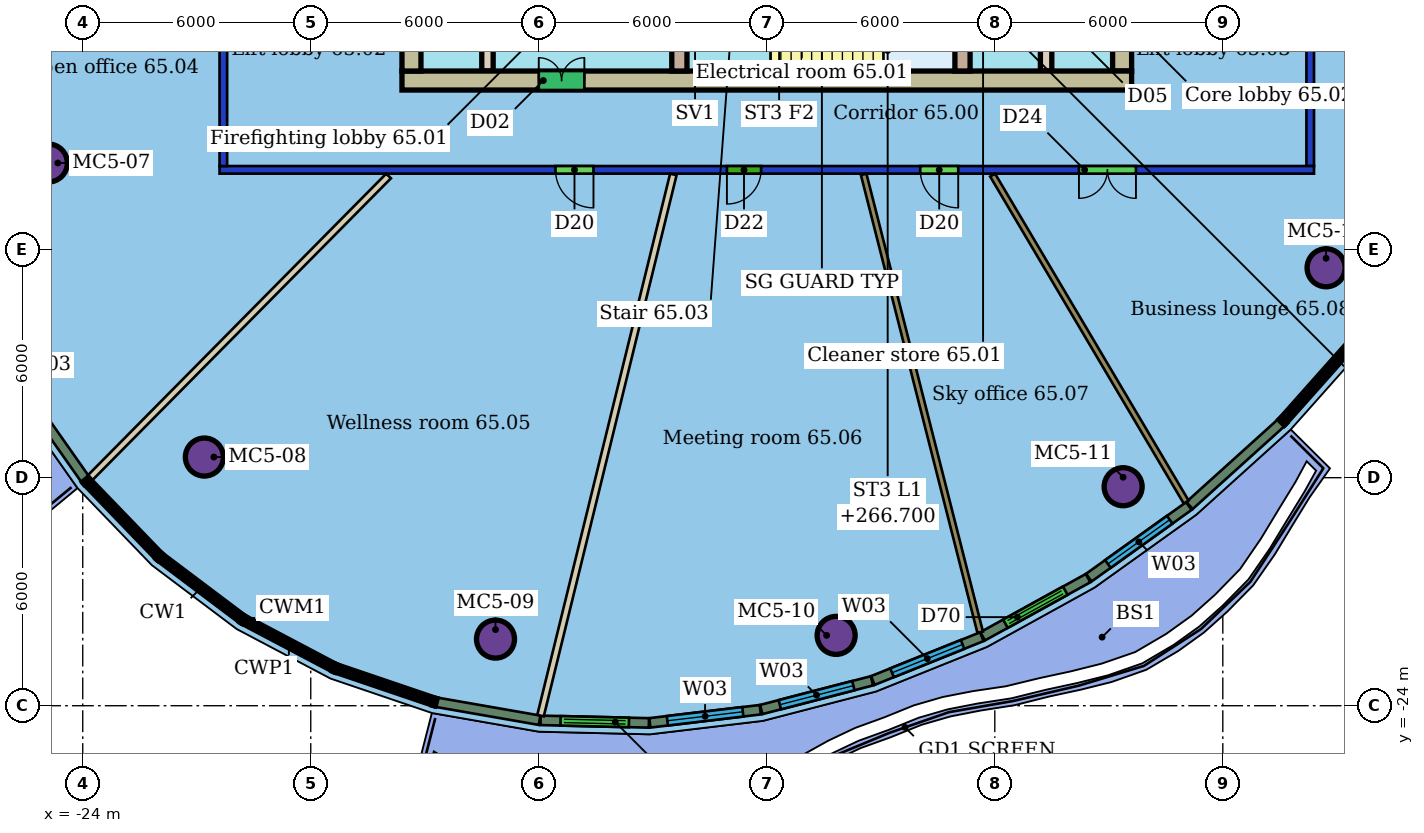
"""IFC4 building model, lengths in metres.
Left out: names, types, materials, properties, quantities, classifications, styles, units other than length and angle.
Written with IfcOpenShell. Run it as: python <this file> out.ifc"""

import sys

from ifc_helpers import new_model, si_unit, direction, frame, frame_2d, origin, origin_2d, place, context, subcontext, project, spatial, rectangle, hollow_circle, extrude, element, fill, save


model = new_model("IFC4")
c1 = context("Model", 3, precision=1e-05, world=origin(), true_north=direction((0.0, 1.0)))
c2 = subcontext(c1, "Body", "Model", "MODEL_VIEW")
j1 = project(units=[si_unit("LENGTHUNIT", "METRE"), si_unit("PLANEANGLEUNIT", "RADIAN")], contexts=[c1])
p1 = place(None, origin())
s1 = spatial("IfcSite", under=j1, at=p1, CompositionType="ELEMENT")
p2 = place(p1, origin())
s2 = spatial("IfcBuilding", under=s1, at=p2, CompositionType="ELEMENT")
p3 = place(p2, frame((0.0, 0.0, 264.9)))
s3 = spatial("IfcBuildingStorey", under=s2, at=p3, CompositionType="ELEMENT", Elevation=264.9)
for number, where, z_axis, x_axis in (
    (1, (-24.906, -9.72, 0.0), (0.0, 0.0, 1.0), (1.0, 0.0, 0.0)),
    (2, (-20.8, -17.457, 0.0), (0.0, 0.0, 1.0), (1.0, 0.0, 0.0)),
    (3, (-13.138, -22.247, 0.0), (0.0, 0.0, 1.0), (1.0, 0.0, 0.0)),
    (4, (-4.175, -22.149, 0.0), (0.0, 0.0, 1.0), (1.0, 0.0, 0.0)),
    (5, (3.377, -18.238, 0.0), (0.0, 0.0, 1.0), (1.0, 0.0, 0.0)),
    (6, (8.718, -12.477, 0.0), (0.0, 0.0, 1.0), (1.0, 0.0, 0.0)),
):
    element("IfcColumn", number, at=place(p3, frame(where, z_axis=z_axis, x_axis=x_axis)), inside=s3, PredefinedType="COLUMN", context=c2, shape_type="SweptSolid", body=[
        extrude(hollow_circle(Radius=0.5, WallThickness=0.04, at=origin_2d()), origin(), (0.0, 0.0, 1.0), 3.45),
    ])
p4 = place(p3, frame((8.4, -9.9, 0.0), z_axis=(0.0, 0.0, 1.0), x_axis=(-1.0, 0.0, 0.0)))
e7 = element("IfcWall", 7, at=p4, inside=s3, PredefinedType="PARTITIONING", context=c2, shape_type="SweptSolid", body=[
    extrude(rectangle(XDim=28.8, YDim=0.2, at=frame_2d((14.4, 0.0))), origin(), (0.0, 0.0, 1.0), 3.1),
])
p5 = place(p4, frame((18.96, 0.0, 0.0)))
e8 = element("IfcOpeningElement", 8, at=p5, cuts=e7, PredefinedType="OPENING", context=c2, shape_type="SweptSolid", body=[
    extrude(rectangle(XDim=1.0, YDim=2.1, at=frame_2d((0.5, 1.05))), frame((0.0, 0.11, 0.0), z_axis=(0.0, -1.0, 0.0), x_axis=(1.0, 0.0, 0.0)), (0.0, 0.0, 1.0), 0.22),
])
p6 = place(p4, frame((14.549, 0.0, 0.0)))
e9 = element("IfcOpeningElement", 9, at=p6, cuts=e7, PredefinedType="OPENING", context=c2, shape_type="SweptSolid", body=[
    extrude(rectangle(XDim=0.9, YDim=2.1, at=frame_2d((0.45, 1.05))), frame((0.0, 0.11, 0.0), z_axis=(0.0, -1.0, 0.0), x_axis=(1.0, 0.0, 0.0)), (0.0, 0.0, 1.0), 0.22),
])
p7 = place(p4, frame((9.362, 0.0, 0.0)))
e10 = element("IfcOpeningElement", 10, at=p7, cuts=e7, PredefinedType="OPENING", context=c2, shape_type="SweptSolid", body=[
    extrude(rectangle(XDim=1.0, YDim=2.1, at=frame_2d((0.5, 1.05))), frame((0.0, 0.11, 0.0), z_axis=(0.0, -1.0, 0.0), x_axis=(1.0, 0.0, 0.0)), (0.0, 0.0, 1.0), 0.22),
])
p8 = place(p4, frame((4.686, 0.0, 0.0)))
e11 = element("IfcOpeningElement", 11, at=p8, cuts=e7, PredefinedType="OPENING", context=c2, shape_type="SweptSolid", body=[
    extrude(rectangle(XDim=1.5, YDim=2.1, at=frame_2d((0.75, 1.05))), frame((0.0, 0.11, 0.0), z_axis=(0.0, -1.0, 0.0), x_axis=(1.0, 0.0, 0.0)), (0.0, 0.0, 1.0), 0.22),
])
p9 = place(p3, frame((-20.3, -9.8, 0.0), z_axis=(0.0, 0.0, 1.0), x_axis=(0.0, 1.0, 0.0)))
e12 = element("IfcWall", 12, at=p9, inside=s3, PredefinedType="PARTITIONING", context=c2, shape_type="SweptSolid", body=[
    extrude(rectangle(XDim=19.6, YDim=0.2, at=frame_2d((9.8, 0.0))), origin(), (0.0, 0.0, 1.0), 3.1),
])
p10 = place(p9, frame((13.483, 0.0, 0.0)))
e13 = element("IfcOpeningElement", 13, at=p10, cuts=e12, PredefinedType="OPENING", context=c2, shape_type="SweptSolid", body=[
    extrude(rectangle(XDim=1.5, YDim=2.4, at=frame_2d((0.75, 1.2))), frame((0.0, 0.11, 0.0), z_axis=(0.0, -1.0, 0.0), x_axis=(1.0, 0.0, 0.0)), (0.0, 0.0, 1.0), 0.22),
])
p11 = place(p9, frame((6.323, 0.0, 0.0)))
e14 = element("IfcOpeningElement", 14, at=p11, cuts=e12, PredefinedType="OPENING", context=c2, shape_type="SweptSolid", body=[
    extrude(rectangle(XDim=1.8, YDim=2.1, at=frame_2d((0.9, 1.05))), frame((0.0, 0.11, 0.0), z_axis=(0.0, -1.0, 0.0), x_axis=(1.0, 0.0, 0.0)), (0.0, 0.0, 1.0), 0.22),
])
p12 = place(p3, frame((8.3, 9.8, 0.0), z_axis=(0.0, 0.0, 1.0), x_axis=(0.0, -1.0, 0.0)))
e15 = element("IfcWall", 15, at=p12, inside=s3, PredefinedType="PARTITIONING", context=c2, shape_type="SweptSolid", body=[
    extrude(rectangle(XDim=19.6, YDim=0.2, at=frame_2d((9.8, 0.0))), origin(), (0.0, 0.0, 1.0), 3.1),
])
p13 = place(p12, frame((7.946, 0.0, 0.0)))
e16 = element("IfcOpeningElement", 16, at=p13, cuts=e15, PredefinedType="OPENING", context=c2, shape_type="SweptSolid", body=[
    extrude(rectangle(XDim=1.8, YDim=2.4, at=frame_2d((0.9, 1.2))), frame((0.0, 0.11, 0.0), z_axis=(0.0, -1.0, 0.0), x_axis=(1.0, 0.0, 0.0)), (0.0, 0.0, 1.0), 0.22),
])
p14 = place(p12, frame((2.533, 0.0, 0.0)))
e17 = element("IfcOpeningElement", 17, at=p14, cuts=e15, PredefinedType="OPENING", context=c2, shape_type="SweptSolid", body=[
    extrude(rectangle(XDim=1.0, YDim=2.4, at=frame_2d((0.5, 1.2))), frame((0.0, 0.11, 0.0), z_axis=(0.0, -1.0, 0.0), x_axis=(1.0, 0.0, 0.0)), (0.0, 0.0, 1.0), 0.22),
])
p15 = place(p3, frame((-23.809, -18.004, 0.0), z_axis=(0.0, 0.0, 1.0), x_axis=(0.703239034198, 0.710953487073, 0.0)))
e18 = element("IfcWall", 18, at=p15, inside=s3, PredefinedType="PARTITIONING", context=c2, shape_type="SweptSolid", body=[
    extrude(rectangle(XDim=11.171, YDim=0.175, at=frame_2d((5.586, 0.0))), origin(), (0.0, 0.0, 1.0), 3.45),
])
p16 = place(p3, frame((-11.954, -24.26, 0.0), z_axis=(0.0, 0.0, 1.0), x_axis=(0.238333250225, 0.971183433671, 0.0)))
e19 = element("IfcWall", 19, at=p16, inside=s3, PredefinedType="PARTITIONING", context=c2, shape_type="SweptSolid", body=[
    extrude(rectangle(XDim=14.662, YDim=0.175, at=frame_2d((7.331, 0.0))), origin(), (0.0, 0.0, 1.0), 3.45),
])
p17 = place(p3, frame((-0.384, -22.067, 0.0), z_axis=(0.0, 0.0, 1.0), x_axis=(-0.246627305847, 0.969110402385, 0.0)))
e20 = element("IfcWall", 20, at=p17, inside=s3, PredefinedType="PARTITIONING", context=c2, shape_type="SweptSolid", body=[
    extrude(rectangle(XDim=12.432, YDim=0.15, at=frame_2d((6.216, 0.0))), origin(), (0.0, 0.0, 1.0), 3.45),
])
p18 = place(p3, frame((5.037, -18.642, 0.0), z_axis=(0.0, 0.0, 1.0), x_axis=(-0.509438244873, 0.860507219412, 0.0)))
e21 = element("IfcWall", 21, at=p18, inside=s3, PredefinedType="PARTITIONING", context=c2, shape_type="SweptSolid", body=[
    extrude(rectangle(XDim=9.999, YDim=0.15, at=frame_2d((5.0, 0.0))), origin(), (0.0, 0.0, 1.0), 3.45),
])
p19 = place(p3, frame((13.298, -8.276, 0.0), z_axis=(0.0, 0.0, 1.0), x_axis=(-0.919039472238, 0.39416550898, 0.0)))
e22 = element("IfcWall", 22, at=p19, inside=s3, PredefinedType="PARTITIONING", context=c2, shape_type="SweptSolid", body=[
    extrude(rectangle(XDim=5.265, YDim=0.3, at=frame_2d((2.633, 0.0))), origin(), (0.0, 0.0, 1.0), 3.45),
])
p20 = place(p3, frame((-25.516, -15.791, 0.0), z_axis=(0.0, 0.0, 1.0), x_axis=(0.574964816713, -0.818178134358, 0.0)))
e23 = element("IfcWall", 23, at=p20, inside=s3, PredefinedType="SOLIDWALL", context=c2, shape_type="SweptSolid", body=[
    extrude(rectangle(XDim=2.746, YDim=0.25, at=frame_2d((1.373, 0.0))), origin(), (0.0, 0.0, 1.0), 3.15),
])
p21 = place(p3, frame((-14.684, -23.91, 0.0), z_axis=(0.0, 0.0, 1.0), x_axis=(0.985123538197, -0.171847649069, 0.0)))
e24 = element("IfcWall", 24, at=p21, inside=s3, PredefinedType="SOLIDWALL", context=c2, shape_type="SweptSolid", body=[
    extrude(rectangle(XDim=2.746, YDim=0.25, at=frame_2d((1.373, 0.0))), origin(), (0.0, 0.0, 1.0), 3.15),
])
p22 = place(p3, frame((-11.952, -24.385, 0.0), z_axis=(0.0, 0.0, 1.0), x_axis=(0.999718659369, -0.023719235002, 0.0)))
e25 = element("IfcWall", 25, at=p22, inside=s3, PredefinedType="SOLIDWALL", context=c2, shape_type="SweptSolid", body=[
    extrude(rectangle(XDim=2.851, YDim=0.25, at=frame_2d((1.426, 0.0))), origin(), (0.0, 0.0, 1.0), 3.15),
])
p23 = place(p22, frame((0.526, 0.0, 0.0)))
e26 = element("IfcOpeningElement", 26, at=p23, cuts=e25, PredefinedType="OPENING", context=c2, shape_type="SweptSolid", body=[
    extrude(rectangle(XDim=1.8, YDim=2.4, at=frame_2d((0.9, 1.2))), frame((0.0, 0.135, 0.0), z_axis=(0.0, -1.0, 0.0), x_axis=(1.0, 0.0, 0.0)), (0.0, 0.0, 1.0), 0.27),
])
p24 = place(p3, frame((-9.076, -24.451, 0.0), z_axis=(0.0, 0.0, 1.0), x_axis=(0.992981045758, 0.11827359285, 0.0)))
e27 = element("IfcWall", 27, at=p24, inside=s3, PredefinedType="SOLIDWALL", context=c2, shape_type="SweptSolid", body=[
    extrude(rectangle(XDim=2.927, YDim=0.25, at=frame_2d((1.463, 0.0))), origin(), (0.0, 0.0, 1.0), 3.15),
])
p25 = place(p24, frame((0.463, 0.0, 0.9)))
e28 = element("IfcOpeningElement", 28, at=p25, cuts=e27, PredefinedType="OPENING", context=c2, shape_type="SweptSolid", body=[
    extrude(rectangle(XDim=2.0, YDim=2.1, at=frame_2d((1.0, 1.05))), frame((0.0, 0.135, 0.0), z_axis=(0.0, -1.0, 0.0), x_axis=(1.0, 0.0, 0.0)), (0.0, 0.0, 1.0), 0.27),
])
p26 = place(p3, frame((-6.146, -24.1, 0.0), z_axis=(0.0, 0.0, 1.0), x_axis=(0.967956734752, 0.25111702381, 0.0)))
e29 = element("IfcWall", 29, at=p26, inside=s3, PredefinedType="SOLIDWALL", context=c2, shape_type="SweptSolid", body=[
    extrude(rectangle(XDim=3.009, YDim=0.25, at=frame_2d((1.504, 0.0))), origin(), (0.0, 0.0, 1.0), 3.15),
])
p27 = place(p26, frame((0.505, 0.0, 0.9)))
e30 = element("IfcOpeningElement", 30, at=p27, cuts=e29, PredefinedType="OPENING", context=c2, shape_type="SweptSolid", body=[
    extrude(rectangle(XDim=2.0, YDim=2.1, at=frame_2d((1.0, 1.05))), frame((0.0, 0.135, 0.0), z_axis=(0.0, -1.0, 0.0), x_axis=(1.0, 0.0, 0.0)), (0.0, 0.0, 1.0), 0.27),
])
p28 = place(p3, frame((-3.21, -23.337, 0.0), z_axis=(0.0, 0.0, 1.0), x_axis=(0.927849089634, 0.372955851093, 0.0)))
e31 = element("IfcWall", 31, at=p28, inside=s3, PredefinedType="SOLIDWALL", context=c2, shape_type="SweptSolid", body=[
    extrude(rectangle(XDim=3.092, YDim=0.25, at=frame_2d((1.546, 0.0))), origin(), (0.0, 0.0, 1.0), 3.15),
])
p29 = place(p28, frame((0.546, 0.0, 0.9)))
e32 = element("IfcOpeningElement", 32, at=p29, cuts=e31, PredefinedType="OPENING", context=c2, shape_type="SweptSolid", body=[
    extrude(rectangle(XDim=2.0, YDim=2.1, at=frame_2d((1.0, 1.05))), frame((0.0, 0.135, 0.0), z_axis=(0.0, -1.0, 0.0), x_axis=(1.0, 0.0, 0.0)), (0.0, 0.0, 1.0), 0.27),
])
p30 = place(p3, frame((-0.32, -22.174, 0.0), z_axis=(0.0, 0.0, 1.0), x_axis=(0.875491155983, 0.483234141794, 0.0)))
e33 = element("IfcWall", 33, at=p30, inside=s3, PredefinedType="SOLIDWALL", context=c2, shape_type="SweptSolid", body=[
    extrude(rectangle(XDim=3.169, YDim=0.25, at=frame_2d((1.584, 0.0))), origin(), (0.0, 0.0, 1.0), 3.15),
])
p31 = place(p30, frame((0.685, 0.0, 0.0)))
e34 = element("IfcOpeningElement", 34, at=p31, cuts=e33, PredefinedType="OPENING", context=c2, shape_type="SweptSolid", body=[
    extrude(rectangle(XDim=1.8, YDim=2.4, at=frame_2d((0.9, 1.2))), frame((0.0, 0.135, 0.0), z_axis=(0.0, -1.0, 0.0), x_axis=(1.0, 0.0, 0.0)), (0.0, 0.0, 1.0), 0.27),
])
p32 = place(p3, frame((2.474, -20.63, 0.0), z_axis=(0.0, 0.0, 1.0), x_axis=(0.81314194721, 0.582065437634, 0.0)))
e35 = element("IfcWall", 35, at=p32, inside=s3, PredefinedType="SOLIDWALL", context=c2, shape_type="SweptSolid", body=[
    extrude(rectangle(XDim=3.237, YDim=0.25, at=frame_2d((1.619, 0.0))), origin(), (0.0, 0.0, 1.0), 3.15),
])
p33 = place(p32, frame((0.619, 0.0, 0.9)))
e36 = element("IfcOpeningElement", 36, at=p33, cuts=e35, PredefinedType="OPENING", context=c2, shape_type="SweptSolid", body=[
    extrude(rectangle(XDim=2.0, YDim=2.1, at=frame_2d((1.0, 1.05))), frame((0.0, 0.135, 0.0), z_axis=(0.0, -1.0, 0.0), x_axis=(1.0, 0.0, 0.0)), (0.0, 0.0, 1.0), 0.27),
])
p34 = place(p3, frame((5.123, -18.732, 0.0), z_axis=(0.0, 0.0, 1.0), x_axis=(0.7424824804, 0.669865483734, 0.0)))
e37 = element("IfcWall", 37, at=p34, inside=s3, PredefinedType="SOLIDWALL", context=c2, shape_type="SweptSolid", body=[
    extrude(rectangle(XDim=3.248, YDim=0.25, at=frame_2d((1.624, 0.0))), origin(), (0.0, 0.0, 1.0), 3.15),
])
p35 = place(p3, frame((-15.6, -7.55, 0.0), z_axis=(0.0, 0.0, 1.0), x_axis=(1.0, 0.0, 0.0)))
e38 = element("IfcWall", 38, at=p35, inside=s3, PredefinedType="SHEAR", context=c2, shape_type="SweptSolid", body=[
    extrude(rectangle(XDim=19.2, YDim=0.5, at=frame_2d((9.6, 0.0))), origin(), (0.0, 0.0, 1.0), 3.3),
])
p36 = place(p35, frame((3.6, 0.0, 0.0)))
e39 = element("IfcOpeningElement", 39, at=p36, cuts=e38, PredefinedType="OPENING", context=c2, shape_type="SweptSolid", body=[
    extrude(rectangle(XDim=1.2, YDim=2.1, at=frame_2d((0.6, 1.05))), frame((0.0, 0.26, 0.0), z_axis=(0.0, -1.0, 0.0), x_axis=(1.0, 0.0, 0.0)), (0.0, 0.0, 1.0), 0.52),
])
p37 = place(p3, frame((-15.35, 7.3, 0.0), z_axis=(0.0, 0.0, 1.0), x_axis=(0.0, -1.0, 0.0)))
e40 = element("IfcWall", 40, at=p37, inside=s3, PredefinedType="SHEAR", context=c2, shape_type="SweptSolid", body=[
    extrude(rectangle(XDim=14.6, YDim=0.5, at=frame_2d((7.3, 0.0))), origin(), (0.0, 0.0, 1.0), 3.3),
])
p38 = place(p37, frame((10.6, 0.0, 0.0)))
e41 = element("IfcOpeningElement", 41, at=p38, cuts=e40, PredefinedType="OPENING", context=c2, shape_type="SweptSolid", body=[
    extrude(rectangle(XDim=1.2, YDim=2.1, at=frame_2d((0.6, 1.05))), frame((0.0, 0.26, 0.0), z_axis=(0.0, -1.0, 0.0), x_axis=(1.0, 0.0, 0.0)), (0.0, 0.0, 1.0), 0.52),
])
p39 = place(p37, frame((2.8, 0.0, 0.0)))
e42 = element("IfcOpeningElement", 42, at=p39, cuts=e40, PredefinedType="OPENING", context=c2, shape_type="SweptSolid", body=[
    extrude(rectangle(XDim=1.2, YDim=2.1, at=frame_2d((0.6, 1.05))), frame((0.0, 0.26, 0.0), z_axis=(0.0, -1.0, 0.0), x_axis=(1.0, 0.0, 0.0)), (0.0, 0.0, 1.0), 0.52),
])
p40 = place(p3, frame((3.35, -7.3, 0.0), z_axis=(0.0, 0.0, 1.0), x_axis=(0.0, 1.0, 0.0)))
e43 = element("IfcWall", 43, at=p40, inside=s3, PredefinedType="SHEAR", context=c2, shape_type="SweptSolid", body=[
    extrude(rectangle(XDim=14.6, YDim=0.5, at=frame_2d((7.3, 0.0))), origin(), (0.0, 0.0, 1.0), 3.3),
])
p41 = place(p40, frame((2.8, 0.0, 0.0)))
e44 = element("IfcOpeningElement", 44, at=p41, cuts=e43, PredefinedType="OPENING", context=c2, shape_type="SweptSolid", body=[
    extrude(rectangle(XDim=1.2, YDim=2.1, at=frame_2d((0.6, 1.05))), frame((0.0, 0.26, 0.0), z_axis=(0.0, -1.0, 0.0), x_axis=(1.0, 0.0, 0.0)), (0.0, 0.0, 1.0), 0.52),
])
p42 = place(p40, frame((10.6, 0.0, 0.0)))
e45 = element("IfcOpeningElement", 45, at=p42, cuts=e43, PredefinedType="OPENING", context=c2, shape_type="SweptSolid", body=[
    extrude(rectangle(XDim=1.2, YDim=2.1, at=frame_2d((0.6, 1.05))), frame((0.0, 0.26, 0.0), z_axis=(0.0, -1.0, 0.0), x_axis=(1.0, 0.0, 0.0)), (0.0, 0.0, 1.0), 0.52),
])
p43 = place(p3, frame((-13.35, 7.3, 0.0), z_axis=(0.0, 0.0, 1.0), x_axis=(0.0, -1.0, 0.0)))
e46 = element("IfcWall", 46, at=p43, inside=s3, PredefinedType="SHEAR", context=c2, shape_type="SweptSolid", body=[
    extrude(rectangle(XDim=14.6, YDim=0.3, at=frame_2d((7.3, 0.0))), origin(), (0.0, 0.0, 1.0), 3.3),
])
p44 = place(p43, frame((6.55, 0.0, 0.0)))
e47 = element("IfcOpeningElement", 47, at=p44, cuts=e46, PredefinedType="OPENING", context=c2, shape_type="SweptSolid", body=[
    extrude(rectangle(XDim=1.5, YDim=2.1, at=frame_2d((0.75, 1.05))), frame((0.0, 0.16, 0.0), z_axis=(0.0, -1.0, 0.0), x_axis=(1.0, 0.0, 0.0)), (0.0, 0.0, 1.0), 0.32),
])
p45 = place(p3, frame((1.35, -7.3, 0.0), z_axis=(0.0, 0.0, 1.0), x_axis=(0.0, 1.0, 0.0)))
e48 = element("IfcWall", 48, at=p45, inside=s3, PredefinedType="SHEAR", context=c2, shape_type="SweptSolid", body=[
    extrude(rectangle(XDim=14.6, YDim=0.3, at=frame_2d((7.3, 0.0))), origin(), (0.0, 0.0, 1.0), 3.3),
])
p46 = place(p45, frame((1.21, 0.0, 0.0)))
e49 = element("IfcOpeningElement", 49, at=p46, cuts=e48, PredefinedType="OPENING", context=c2, shape_type="SweptSolid", body=[
    extrude(rectangle(XDim=1.0, YDim=2.1, at=frame_2d((0.5, 1.05))), frame((0.0, 0.16, 0.0), z_axis=(0.0, -1.0, 0.0), x_axis=(1.0, 0.0, 0.0)), (0.0, 0.0, 1.0), 0.32),
])
p47 = place(p45, frame((6.55, 0.0, 0.0)))
e50 = element("IfcOpeningElement", 50, at=p47, cuts=e48, PredefinedType="OPENING", context=c2, shape_type="SweptSolid", body=[
    extrude(rectangle(XDim=1.5, YDim=2.1, at=frame_2d((0.75, 1.05))), frame((0.0, 0.16, 0.0), z_axis=(0.0, -1.0, 0.0), x_axis=(1.0, 0.0, 0.0)), (0.0, 0.0, 1.0), 0.32),
])
p48 = place(p3, frame((-8.3, -3.88, 0.0), z_axis=(0.0, 0.0, 1.0), x_axis=(0.0, -1.0, 0.0)))
e51 = element("IfcWall", 51, at=p48, inside=s3, PredefinedType="SHEAR", context=c2, shape_type="SweptSolid", body=[
    extrude(rectangle(XDim=3.42, YDim=0.4, at=frame_2d((1.71, 0.0))), origin(), (0.0, 0.0, 1.0), 3.3),
])
p49 = place(p48, frame((1.11, 0.0, 0.0)))
e52 = element("IfcOpeningElement", 52, at=p49, cuts=e51, PredefinedType="OPENING", context=c2, shape_type="SweptSolid", body=[
    extrude(rectangle(XDim=1.2, YDim=2.1, at=frame_2d((0.6, 1.05))), frame((0.0, 0.21, 0.0), z_axis=(0.0, -1.0, 0.0), x_axis=(1.0, 0.0, 0.0)), (0.0, 0.0, 1.0), 0.42),
])
p50 = place(p3, frame((-0.85, -3.88, 0.0), z_axis=(0.0, 0.0, 1.0), x_axis=(0.0, -1.0, 0.0)))
e53 = element("IfcWall", 53, at=p50, inside=s3, PredefinedType="SHEAR", context=c2, shape_type="SweptSolid", body=[
    extrude(rectangle(XDim=3.42, YDim=0.4, at=frame_2d((1.71, 0.0))), origin(), (0.0, 0.0, 1.0), 3.3),
])
p51 = place(p5, origin())
e54 = element("IfcDoor", 54, at=p51, inside=s3, OperationType="SINGLE_SWING_LEFT", PredefinedType="DOOR", context=c2, shape_type="SweptSolid", body=[
    extrude(rectangle(XDim=1.0, YDim=2.1, at=frame_2d((0.5, 1.05))), frame((0.0, 0.025, 0.0), z_axis=(0.0, -1.0, 0.0), x_axis=(1.0, 0.0, 0.0)), (0.0, 0.0, 1.0), 0.05),
])
fill(e8, e54)
p52 = place(p6, origin())
e55 = element("IfcDoor", 55, at=p52, inside=s3, OperationType="SINGLE_SWING_RIGHT", PredefinedType="DOOR", context=c2, shape_type="SweptSolid", body=[
    extrude(rectangle(XDim=0.9, YDim=2.1, at=frame_2d((0.45, 1.05))), frame((0.0, 0.025, 0.0), z_axis=(0.0, -1.0, 0.0), x_axis=(1.0, 0.0, 0.0)), (0.0, 0.0, 1.0), 0.05),
])
fill(e9, e55)
p53 = place(p7, origin())
e56 = element("IfcDoor", 56, at=p53, inside=s3, OperationType="SINGLE_SWING_LEFT", PredefinedType="DOOR", context=c2, shape_type="SweptSolid", body=[
    extrude(rectangle(XDim=1.0, YDim=2.1, at=frame_2d((0.5, 1.05))), frame((0.0, 0.025, 0.0), z_axis=(0.0, -1.0, 0.0), x_axis=(1.0, 0.0, 0.0)), (0.0, 0.0, 1.0), 0.05),
])
fill(e10, e56)
p54 = place(p8, origin())
e57 = element("IfcDoor", 57, at=p54, inside=s3, OperationType="DOUBLE_DOOR_SINGLE_SWING", PredefinedType="DOOR", context=c2, shape_type="SweptSolid", body=[
    extrude(rectangle(XDim=1.5, YDim=2.1, at=frame_2d((0.75, 1.05))), frame((0.0, 0.025, 0.0), z_axis=(0.0, -1.0, 0.0), x_axis=(1.0, 0.0, 0.0)), (0.0, 0.0, 1.0), 0.05),
])
fill(e11, e57)
p55 = place(p23, origin())
e58 = element("IfcDoor", 58, at=p55, inside=s3, OperationType="DOUBLE_DOOR_SLIDING", PredefinedType="DOOR", context=c2, shape_type="SweptSolid", body=[
    extrude(rectangle(XDim=1.8, YDim=2.4, at=frame_2d((0.9, 1.2))), frame((0.0, 0.025, 0.0), z_axis=(0.0, -1.0, 0.0), x_axis=(1.0, 0.0, 0.0)), (0.0, 0.0, 1.0), 0.05),
])
fill(e26, e58)
p56 = place(p25, origin())
e59 = element("IfcWindow", 59, at=p56, inside=s3, PartitioningType="SINGLE_PANEL", PredefinedType="WINDOW", context=c2, shape_type="SweptSolid", body=[
    extrude(rectangle(XDim=2.0, YDim=2.1, at=frame_2d((1.0, 1.05))), frame((0.0, 0.03, 0.0), z_axis=(0.0, -1.0, 0.0), x_axis=(1.0, 0.0, 0.0)), (0.0, 0.0, 1.0), 0.06),
])
fill(e28, e59)
p57 = place(p27, origin())
e60 = element("IfcWindow", 60, at=p57, inside=s3, PartitioningType="SINGLE_PANEL", PredefinedType="WINDOW", context=c2, shape_type="SweptSolid", body=[
    extrude(rectangle(XDim=2.0, YDim=2.1, at=frame_2d((1.0, 1.05))), frame((0.0, 0.03, 0.0), z_axis=(0.0, -1.0, 0.0), x_axis=(1.0, 0.0, 0.0)), (0.0, 0.0, 1.0), 0.06),
])
fill(e30, e60)
p58 = place(p29, origin())
e61 = element("IfcWindow", 61, at=p58, inside=s3, PartitioningType="SINGLE_PANEL", PredefinedType="WINDOW", context=c2, shape_type="SweptSolid", body=[
    extrude(rectangle(XDim=2.0, YDim=2.1, at=frame_2d((1.0, 1.05))), frame((0.0, 0.03, 0.0), z_axis=(0.0, -1.0, 0.0), x_axis=(1.0, 0.0, 0.0)), (0.0, 0.0, 1.0), 0.06),
])
fill(e32, e61)
p59 = place(p31, origin())
e62 = element("IfcDoor", 62, at=p59, inside=s3, OperationType="DOUBLE_DOOR_SLIDING", PredefinedType="DOOR", context=c2, shape_type="SweptSolid", body=[
    extrude(rectangle(XDim=1.8, YDim=2.4, at=frame_2d((0.9, 1.2))), frame((0.0, 0.025, 0.0), z_axis=(0.0, -1.0, 0.0), x_axis=(1.0, 0.0, 0.0)), (0.0, 0.0, 1.0), 0.05),
])
fill(e34, e62)
p60 = place(p33, origin())
e63 = element("IfcWindow", 63, at=p60, inside=s3, PartitioningType="SINGLE_PANEL", PredefinedType="WINDOW", context=c2, shape_type="SweptSolid", body=[
    extrude(rectangle(XDim=2.0, YDim=2.1, at=frame_2d((1.0, 1.05))), frame((0.0, 0.03, 0.0), z_axis=(0.0, -1.0, 0.0), x_axis=(1.0, 0.0, 0.0)), (0.0, 0.0, 1.0), 0.06),
])
fill(e36, e63)
p61 = place(p36, origin())
e64 = element("IfcDoor", 64, at=p61, inside=s3, OperationType="DOUBLE_DOOR_SINGLE_SWING", PredefinedType="NOTDEFINED", context=c2, shape_type="SweptSolid", body=[
    extrude(rectangle(XDim=1.2, YDim=2.1, at=frame_2d((0.6, 1.05))), frame((0.0, 0.025, 0.0), z_axis=(0.0, -1.0, 0.0), x_axis=(1.0, 0.0, 0.0)), (0.0, 0.0, 1.0), 0.05),
])
fill(e39, e64)
save(model, sys.argv[1])
